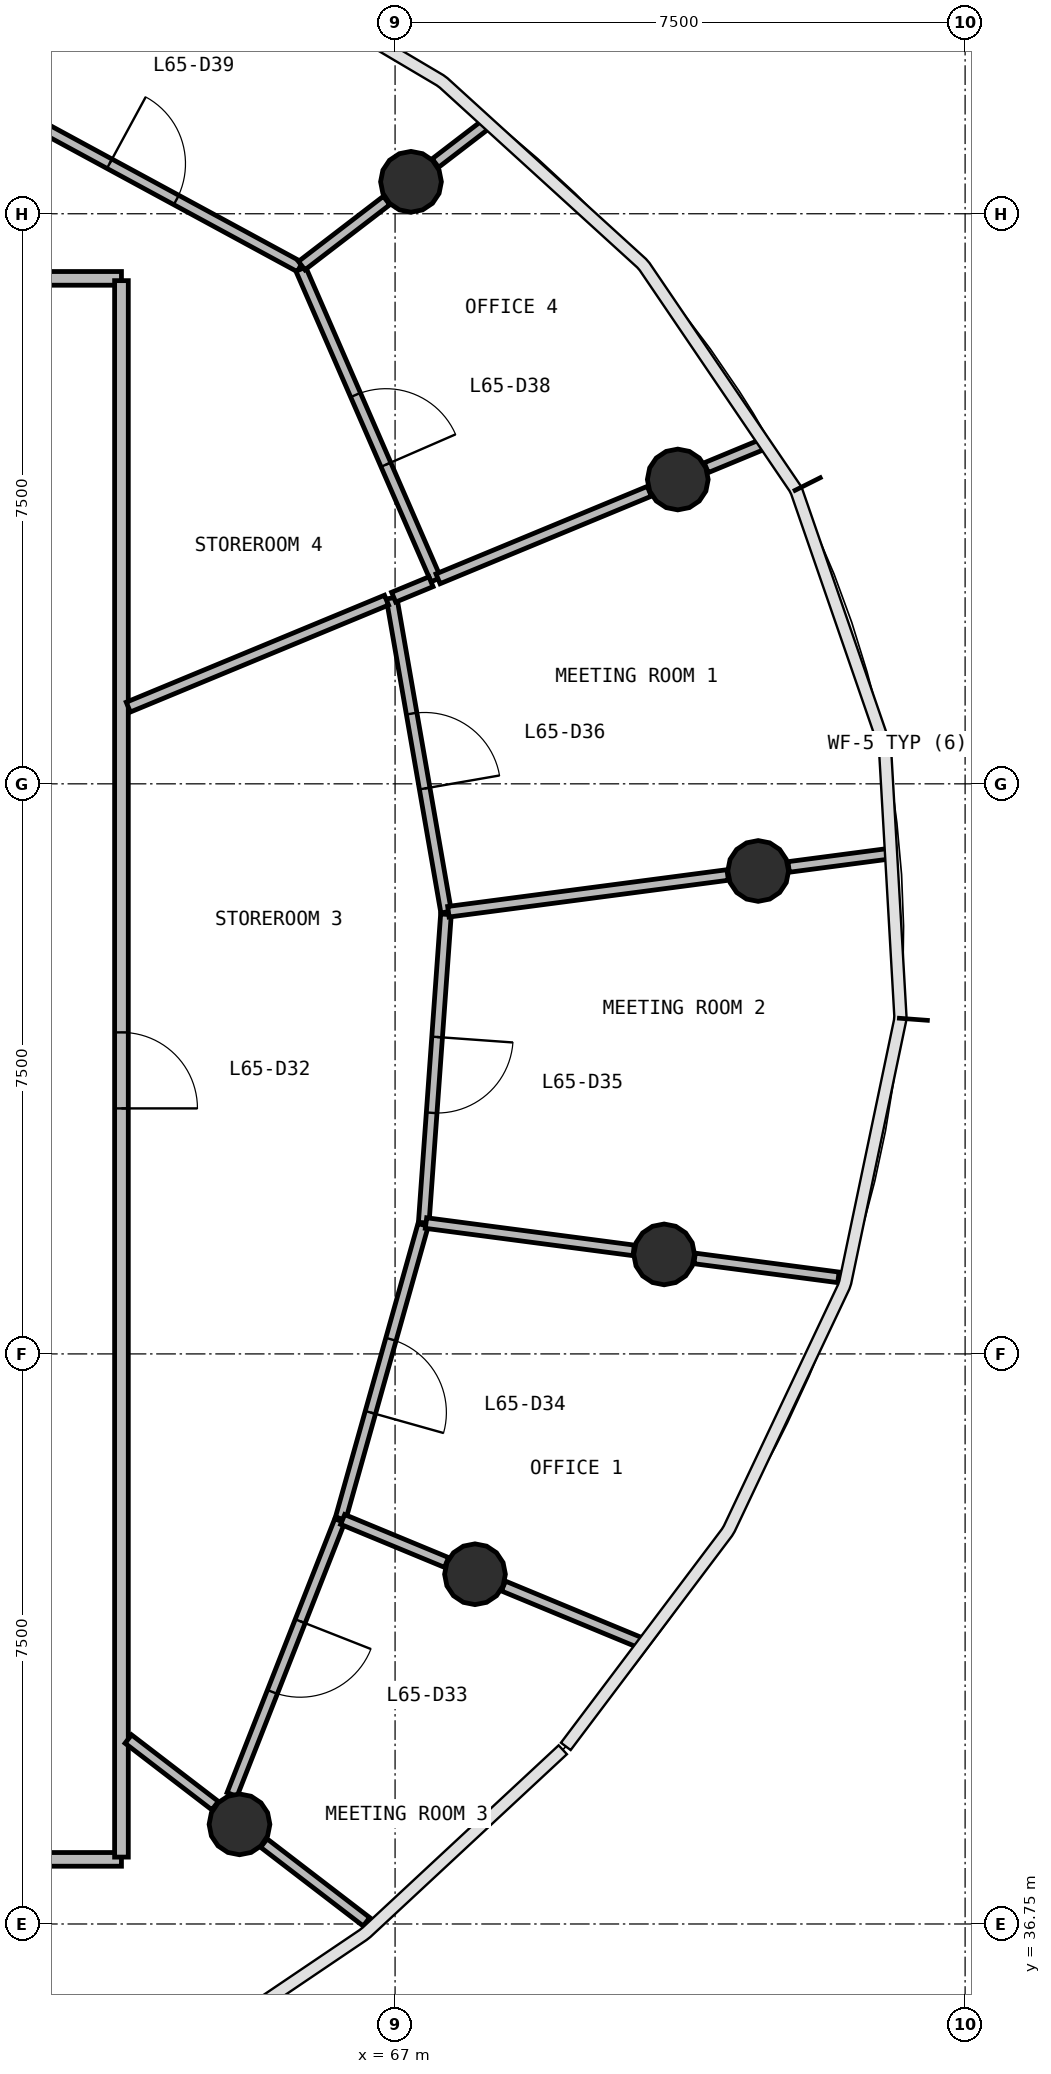
"""IFC4 building model, lengths in metres.
Left out: names, types, materials, properties, quantities, classifications, styles, units other than length and angle.
Written with IfcOpenShell. Run it as: python <this file> out.ifc"""

import sys

from ifc_helpers import new_model, si_unit, direction, frame, frame_2d, origin, origin_2d, place, context, subcontext, project, spatial, rectangle, circle, extrude, source, transform, mapped, element, fill, save


model = new_model("IFC4")
c1 = context("Model", 3, precision=1e-05, world=origin(), true_north=direction((0.0, 1.0)))
c2 = subcontext(c1, "Body", "Model", "MODEL_VIEW")
j1 = project(units=[si_unit("LENGTHUNIT", "METRE"), si_unit("PLANEANGLEUNIT", "RADIAN")], contexts=[c1])
p1 = place(None, origin())
s1 = spatial("IfcSite", under=j1, at=p1, CompositionType="ELEMENT")
p2 = place(p1, origin())
s2 = spatial("IfcBuilding", under=s1, at=p2, CompositionType="ELEMENT")
p3 = place(p2, frame((0.0, 0.0, 265.7)))
s3 = spatial("IfcBuildingStorey", under=s2, at=p3, CompositionType="ELEMENT", Elevation=265.7)
m1 = source(origin(), c2, "Body", "SweptSolid", [
    extrude(circle(Radius=0.4, at=origin_2d()), origin(), (0.0, 0.0, 1.0), 3.9),
])
for number, where, z_axis, x_axis in (
    (1, (71.777, 50.604, 0.0), (0.0, 0.0, 1.0), (1.0, 0.0, 0.0)),
    (2, (70.719, 55.754, 0.0), (0.0, 0.0, 1.0), (1.0, 0.0, 0.0)),
    (3, (67.209, 59.671, 0.0), (0.0, 0.0, 1.0), (1.0, 0.0, 0.0)),
    (4, (64.953, 38.061, 0.0), (0.0, 0.0, 1.0), (1.0, 0.0, 0.0)),
    (5, (68.052, 41.351, 0.0), (0.0, 0.0, 1.0), (1.0, 0.0, 0.0)),
    (6, (70.54, 45.559, 0.0), (0.0, 0.0, 1.0), (1.0, 0.0, 0.0)),
):
    element("IfcColumn", number, at=place(p3, frame(where, z_axis=z_axis, x_axis=x_axis)), inside=s3, PredefinedType="COLUMN", context=c2, shape_type="MappedRepresentation", body=[
        mapped(m1, transform((0.0, 0.0, 0.0), scale=1.0)),
    ])
p4 = place(p3, frame((40.6, 58.4, 0.0), z_axis=(0.0, 0.0, 1.0), x_axis=(1.0, 0.0, 0.0)))
e7 = element("IfcWall", 7, at=p4, inside=s3, PredefinedType="PARTITIONING", context=c2, shape_type="SweptSolid", body=[
    extrude(rectangle(XDim=22.8, YDim=0.18, at=frame_2d((11.4, 0.0))), origin(), (0.0, 0.0, 1.0), 2.92),
])
p5 = place(p4, frame((13.05, 0.0, 0.0)))
e8 = element("IfcOpeningElement", 8, at=p5, cuts=e7, PredefinedType="OPENING", context=c2, shape_type="SweptSolid", body=[
    extrude(rectangle(XDim=0.9, YDim=2.1, at=frame_2d((0.45, 1.05))), frame((0.0, 0.1, 0.0), z_axis=(0.0, -1.0, 0.0), x_axis=(1.0, 0.0, 0.0)), (0.0, 0.0, 1.0), 0.2),
])
p6 = place(p4, frame((10.85, 0.0, 0.0)))
e9 = element("IfcOpeningElement", 9, at=p6, cuts=e7, PredefinedType="OPENING", context=c2, shape_type="SweptSolid", body=[
    extrude(rectangle(XDim=0.9, YDim=2.1, at=frame_2d((0.45, 1.05))), frame((0.0, 0.1, 0.0), z_axis=(0.0, -1.0, 0.0), x_axis=(1.0, 0.0, 0.0)), (0.0, 0.0, 1.0), 0.2),
])
p7 = place(p4, frame((8.75, 0.0, 0.0)))
e10 = element("IfcOpeningElement", 10, at=p7, cuts=e7, PredefinedType="OPENING", context=c2, shape_type="SweptSolid", body=[
    extrude(rectangle(XDim=1.0, YDim=2.1, at=frame_2d((0.5, 1.05))), frame((0.0, 0.1, 0.0), z_axis=(0.0, -1.0, 0.0), x_axis=(1.0, 0.0, 0.0)), (0.0, 0.0, 1.0), 0.2),
])
p8 = place(p4, frame((16.15, 0.0, 0.0)))
e11 = element("IfcOpeningElement", 11, at=p8, cuts=e7, PredefinedType="OPENING", context=c2, shape_type="SweptSolid", body=[
    extrude(rectangle(XDim=1.0, YDim=2.1, at=frame_2d((0.5, 1.05))), frame((0.0, 0.1, 0.0), z_axis=(0.0, -1.0, 0.0), x_axis=(1.0, 0.0, 0.0)), (0.0, 0.0, 1.0), 0.2),
])
p9 = place(p3, frame((63.4, 37.6, 0.0), z_axis=(0.0, 0.0, 1.0), x_axis=(-1.0, 0.0, 0.0)))
e12 = element("IfcWall", 12, at=p9, inside=s3, PredefinedType="PARTITIONING", context=c2, shape_type="SweptSolid", body=[
    extrude(rectangle(XDim=22.8, YDim=0.18, at=frame_2d((11.4, 0.0))), origin(), (0.0, 0.0, 1.0), 2.92),
])
p10 = place(p9, frame((16.15, 0.0, 0.0)))
e13 = element("IfcOpeningElement", 13, at=p10, cuts=e12, PredefinedType="OPENING", context=c2, shape_type="SweptSolid", body=[
    extrude(rectangle(XDim=1.0, YDim=2.1, at=frame_2d((0.5, 1.05))), frame((0.0, 0.1, 0.0), z_axis=(0.0, -1.0, 0.0), x_axis=(1.0, 0.0, 0.0)), (0.0, 0.0, 1.0), 0.2),
])
p11 = place(p9, frame((10.95, 0.0, 0.0)))
e14 = element("IfcOpeningElement", 14, at=p11, cuts=e12, PredefinedType="OPENING", context=c2, shape_type="SweptSolid", body=[
    extrude(rectangle(XDim=1.0, YDim=2.1, at=frame_2d((0.5, 1.05))), frame((0.0, 0.1, 0.0), z_axis=(0.0, -1.0, 0.0), x_axis=(1.0, 0.0, 0.0)), (0.0, 0.0, 1.0), 0.2),
])
p12 = place(p9, frame((8.75, 0.0, 0.0)))
e15 = element("IfcOpeningElement", 15, at=p12, cuts=e12, PredefinedType="OPENING", context=c2, shape_type="SweptSolid", body=[
    extrude(rectangle(XDim=1.0, YDim=2.1, at=frame_2d((0.5, 1.05))), frame((0.0, 0.1, 0.0), z_axis=(0.0, -1.0, 0.0), x_axis=(1.0, 0.0, 0.0)), (0.0, 0.0, 1.0), 0.2),
])
p13 = place(p3, frame((63.4, 58.37, 0.0), z_axis=(0.0, 0.0, 1.0), x_axis=(0.0, -1.0, 0.0)))
e16 = element("IfcWall", 16, at=p13, inside=s3, PredefinedType="PARTITIONING", context=c2, shape_type="SweptSolid", body=[
    extrude(rectangle(XDim=20.74, YDim=0.18, at=frame_2d((10.37, 0.0))), origin(), (0.0, 0.0, 1.0), 2.92),
])
p14 = place(p13, frame((9.89, 0.0, 0.0)))
e17 = element("IfcOpeningElement", 17, at=p14, cuts=e16, PredefinedType="OPENING", context=c2, shape_type="SweptSolid", body=[
    extrude(rectangle(XDim=1.0, YDim=2.1, at=frame_2d((0.5, 1.05))), frame((0.0, 0.1, 0.0), z_axis=(0.0, -1.0, 0.0), x_axis=(1.0, 0.0, 0.0)), (0.0, 0.0, 1.0), 0.2),
])
p15 = place(p3, frame((61.756, 60.714, 0.0), z_axis=(0.0, 0.0, 1.0), x_axis=(0.879039493049, -0.47674895874, 0.0)))
e18 = element("IfcWall", 18, at=p15, inside=s3, PredefinedType="PARTITIONING", context=c2, shape_type="SweptSolid", body=[
    extrude(rectangle(XDim=4.541, YDim=0.14, at=frame_2d((2.271, 0.0))), origin(), (0.0, 0.0, 1.0), 2.92),
])
p16 = place(p15, frame((1.691, 0.0, 0.0)))
e19 = element("IfcOpeningElement", 19, at=p16, cuts=e18, PredefinedType="OPENING", context=c2, shape_type="SweptSolid", body=[
    extrude(rectangle(XDim=1.0, YDim=2.1, at=frame_2d((0.5, 1.05))), frame((0.0, 0.08, 0.0), z_axis=(0.0, -1.0, 0.0), x_axis=(1.0, 0.0, 0.0)), (0.0, 0.0, 1.0), 0.16),
])
p17 = place(p3, frame((65.76, 58.521, 0.0), z_axis=(0.0, 0.0, 1.0), x_axis=(0.398952504151, -0.916971591398, 0.0)))
e20 = element("IfcWall", 20, at=p17, inside=s3, PredefinedType="PARTITIONING", context=c2, shape_type="SweptSolid", body=[
    extrude(rectangle(XDim=4.456, YDim=0.14, at=frame_2d((2.228, 0.0))), origin(), (0.0, 0.0, 1.0), 2.92),
])
p18 = place(p17, frame((1.806, 0.0, 0.0)))
e21 = element("IfcOpeningElement", 21, at=p18, cuts=e20, PredefinedType="OPENING", context=c2, shape_type="SweptSolid", body=[
    extrude(rectangle(XDim=1.0, YDim=2.1, at=frame_2d((0.5, 1.05))), frame((0.0, 0.08, 0.0), z_axis=(0.0, -1.0, 0.0), x_axis=(1.0, 0.0, 0.0)), (0.0, 0.0, 1.0), 0.16),
])
p19 = place(p3, frame((66.954, 54.194, 0.0), z_axis=(0.0, 0.0, 1.0), x_axis=(0.171306772049, -0.985217737279, 0.0)))
e22 = element("IfcWall", 22, at=p19, inside=s3, PredefinedType="PARTITIONING", context=c2, shape_type="SweptSolid", body=[
    extrude(rectangle(XDim=4.193, YDim=0.14, at=frame_2d((2.096, 0.0))), origin(), (0.0, 0.0, 1.0), 2.92),
])
p20 = place(p19, frame((1.543, 0.0, 0.0)))
e23 = element("IfcOpeningElement", 23, at=p20, cuts=e22, PredefinedType="OPENING", context=c2, shape_type="SweptSolid", body=[
    extrude(rectangle(XDim=1.0, YDim=2.1, at=frame_2d((0.5, 1.05))), frame((0.0, 0.08, 0.0), z_axis=(0.0, -1.0, 0.0), x_axis=(1.0, 0.0, 0.0)), (0.0, 0.0, 1.0), 0.16),
])
p21 = place(p3, frame((67.67, 50.033, 0.0), z_axis=(0.0, 0.0, 1.0), x_axis=(-0.071895294676, -0.997412184908, 0.0)))
e24 = element("IfcWall", 24, at=p21, inside=s3, PredefinedType="PARTITIONING", context=c2, shape_type="SweptSolid", body=[
    extrude(rectangle(XDim=4.068, YDim=0.14, at=frame_2d((2.034, 0.0))), origin(), (0.0, 0.0, 1.0), 2.92),
])
p22 = place(p21, frame((1.618, 0.0, 0.0)))
e25 = element("IfcOpeningElement", 25, at=p22, cuts=e24, PredefinedType="OPENING", context=c2, shape_type="SweptSolid", body=[
    extrude(rectangle(XDim=1.0, YDim=2.1, at=frame_2d((0.5, 1.05))), frame((0.0, 0.08, 0.0), z_axis=(0.0, -1.0, 0.0), x_axis=(1.0, 0.0, 0.0)), (0.0, 0.0, 1.0), 0.16),
])
p23 = place(p3, frame((67.369, 45.947, 0.0), z_axis=(0.0, 0.0, 1.0), x_axis=(-0.270692717002, -0.962665805439, 0.0)))
e26 = element("IfcWall", 26, at=p23, inside=s3, PredefinedType="PARTITIONING", context=c2, shape_type="SweptSolid", body=[
    extrude(rectangle(XDim=4.013, YDim=0.14, at=frame_2d((2.006, 0.0))), origin(), (0.0, 0.0, 1.0), 2.92),
])
p24 = place(p23, frame((1.562, 0.0, 0.0)))
e27 = element("IfcOpeningElement", 27, at=p24, cuts=e26, PredefinedType="OPENING", context=c2, shape_type="SweptSolid", body=[
    extrude(rectangle(XDim=1.0, YDim=2.1, at=frame_2d((0.5, 1.05))), frame((0.0, 0.08, 0.0), z_axis=(0.0, -1.0, 0.0), x_axis=(1.0, 0.0, 0.0)), (0.0, 0.0, 1.0), 0.16),
])
p25 = place(p3, frame((66.272, 42.056, 0.0), z_axis=(0.0, 0.0, 1.0), x_axis=(-0.365958681955, -0.930631099363, 0.0)))
e28 = element("IfcWall", 28, at=p25, inside=s3, PredefinedType="PARTITIONING", context=c2, shape_type="SweptSolid", body=[
    extrude(rectangle(XDim=3.871, YDim=0.14, at=frame_2d((1.936, 0.0))), origin(), (0.0, 0.0, 1.0), 2.92),
])
p26 = place(p25, frame((1.421, 0.0, 0.0)))
e29 = element("IfcOpeningElement", 29, at=p26, cuts=e28, PredefinedType="OPENING", context=c2, shape_type="SweptSolid", body=[
    extrude(rectangle(XDim=1.0, YDim=2.1, at=frame_2d((0.5, 1.05))), frame((0.0, 0.08, 0.0), z_axis=(0.0, -1.0, 0.0), x_axis=(1.0, 0.0, 0.0)), (0.0, 0.0, 1.0), 0.16),
])
p27 = place(p3, frame((63.49, 52.759, 0.0), z_axis=(0.0, 0.0, 1.0), x_axis=(0.923884131492, 0.382672329255, 0.0)))
e30 = element("IfcWall", 30, at=p27, inside=s3, PredefinedType="PARTITIONING", context=c2, shape_type="SweptSolid", body=[
    extrude(rectangle(XDim=3.677, YDim=0.14, at=frame_2d((1.839, 0.0))), origin(), (0.0, 0.0, 1.0), 2.92),
])
p28 = place(p3, frame((67.701, 50.067, 0.0), z_axis=(0.0, 0.0, 1.0), x_axis=(0.991450259567, 0.130485182315, 0.0)))
e31 = element("IfcWall", 31, at=p28, inside=s3, PredefinedType="PARTITIONING", context=c2, shape_type="SweptSolid", body=[
    extrude(rectangle(XDim=3.707, YDim=0.14, at=frame_2d((1.853, 0.0))), origin(), (0.0, 0.0, 1.0), 2.92),
])
p29 = place(p3, frame((67.565, 54.447, 0.0), z_axis=(0.0, 0.0, 1.0), x_axis=(0.923881369595, 0.382678997223, 0.0)))
e32 = element("IfcWall", 32, at=p29, inside=s3, PredefinedType="PARTITIONING", context=c2, shape_type="SweptSolid", body=[
    extrude(rectangle(XDim=3.009, YDim=0.14, at=frame_2d((1.505, 0.0))), origin(), (0.0, 0.0, 1.0), 2.92),
])
p30 = place(p3, frame((67.407, 45.972, 0.0), z_axis=(0.0, 0.0, 1.0), x_axis=(0.991448565266, -0.13049805528, 0.0)))
e33 = element("IfcWall", 33, at=p30, inside=s3, PredefinedType="PARTITIONING", context=c2, shape_type="SweptSolid", body=[
    extrude(rectangle(XDim=2.756, YDim=0.14, at=frame_2d((1.378, 0.0))), origin(), (0.0, 0.0, 1.0), 2.92),
])
p31 = place(p3, frame((68.426, 41.196, 0.0), z_axis=(0.0, 0.0, 1.0), x_axis=(0.923874199787, -0.382696306447, 0.0)))
e34 = element("IfcWall", 34, at=p31, inside=s3, PredefinedType="PARTITIONING", context=c2, shape_type="SweptSolid", body=[
    extrude(rectangle(XDim=1.961, YDim=0.14, at=frame_2d((0.98, 0.0))), origin(), (0.0, 0.0, 1.0), 2.92),
])
p32 = place(p3, frame((70.941, 45.506, 0.0), z_axis=(0.0, 0.0, 1.0), x_axis=(0.991447762037, -0.130504157605, 0.0)))
e35 = element("IfcWall", 35, at=p32, inside=s3, PredefinedType="PARTITIONING", context=c2, shape_type="SweptSolid", body=[
    extrude(rectangle(XDim=1.908, YDim=0.14, at=frame_2d((0.954, 0.0))), origin(), (0.0, 0.0, 1.0), 2.92),
])
p33 = place(p3, frame((65.274, 37.814, 0.0), z_axis=(0.0, 0.0, 1.0), x_axis=(0.793391519138, -0.608711670136, 0.0)))
e36 = element("IfcWall", 36, at=p33, inside=s3, PredefinedType="PARTITIONING", context=c2, shape_type="SweptSolid", body=[
    extrude(rectangle(XDim=1.701, YDim=0.14, at=frame_2d((0.851, 0.0))), origin(), (0.0, 0.0, 1.0), 2.92),
])
p34 = place(p3, frame((63.49, 39.183, 0.0), z_axis=(0.0, 0.0, 1.0), x_axis=(0.793316945216, -0.608808857059, 0.0)))
e37 = element("IfcWall", 37, at=p34, inside=s3, PredefinedType="PARTITIONING", context=c2, shape_type="SweptSolid", body=[
    extrude(rectangle(XDim=1.44, YDim=0.14, at=frame_2d((0.72, 0.0))), origin(), (0.0, 0.0, 1.0), 2.92),
])
p35 = place(p3, frame((66.311, 42.073, 0.0), z_axis=(0.0, 0.0, 1.0), x_axis=(0.923807607281, -0.382857029098, 0.0)))
e38 = element("IfcWall", 38, at=p35, inside=s3, PredefinedType="PARTITIONING", context=c2, shape_type="SweptSolid", body=[
    extrude(rectangle(XDim=1.479, YDim=0.14, at=frame_2d((0.74, 0.0))), origin(), (0.0, 0.0, 1.0), 2.92),
])
p36 = place(p3, frame((65.771, 58.567, 0.0), z_axis=(0.0, 0.0, 1.0), x_axis=(0.793313221417, 0.608813709376, 0.0)))
e39 = element("IfcWall", 39, at=p36, inside=s3, PredefinedType="PARTITIONING", context=c2, shape_type="SweptSolid", body=[
    extrude(rectangle(XDim=1.408, YDim=0.14, at=frame_2d((0.704, 0.0))), origin(), (0.0, 0.0, 1.0), 2.92),
])
p37 = place(p3, frame((61.799, 60.771, 0.0), z_axis=(0.0, 0.0, 1.0), x_axis=(0.608805214603, 0.793319740503, 0.0)))
e40 = element("IfcWall", 40, at=p37, inside=s3, PredefinedType="PARTITIONING", context=c2, shape_type="SweptSolid", body=[
    extrude(rectangle(XDim=1.317, YDim=0.14, at=frame_2d((0.658, 0.0))), origin(), (0.0, 0.0, 1.0), 2.92),
])
p38 = place(p3, frame((72.178, 50.656, 0.0), z_axis=(0.0, 0.0, 1.0), x_axis=(0.991442117533, 0.13054703207, 0.0)))
e41 = element("IfcWall", 41, at=p38, inside=s3, PredefinedType="PARTITIONING", context=c2, shape_type="SweptSolid", body=[
    extrude(rectangle(XDim=1.365, YDim=0.14, at=frame_2d((0.683, 0.0))), origin(), (0.0, 0.0, 1.0), 2.92),
])
p39 = place(p3, frame((67.531, 59.917, 0.0), z_axis=(0.0, 0.0, 1.0), x_axis=(0.793396032013, 0.608705788034, 0.0)))
e42 = element("IfcWall", 42, at=p39, inside=s3, PredefinedType="PARTITIONING", context=c2, shape_type="SweptSolid", body=[
    extrude(rectangle(XDim=0.822, YDim=0.14, at=frame_2d((0.411, 0.0))), origin(), (0.0, 0.0, 1.0), 2.92),
])
p40 = place(p3, frame((71.094, 55.909, 0.0), z_axis=(0.0, 0.0, 1.0), x_axis=(0.923945811289, 0.382523382031, 0.0)))
e43 = element("IfcWall", 43, at=p40, inside=s3, PredefinedType="PARTITIONING", context=c2, shape_type="SweptSolid", body=[
    extrude(rectangle(XDim=0.796, YDim=0.14, at=frame_2d((0.398, 0.0))), origin(), (0.0, 0.0, 1.0), 2.92),
])
p41 = place(p3, frame((66.981, 54.206, 0.0), z_axis=(0.0, 0.0, 1.0), x_axis=(0.923944086963, 0.382527546938, 0.0)))
e44 = element("IfcWall", 44, at=p41, inside=s3, PredefinedType="PARTITIONING", context=c2, shape_type="SweptSolid", body=[
    extrude(rectangle(XDim=0.532, YDim=0.14, at=frame_2d((0.266, 0.0))), origin(), (0.0, 0.0, 1.0), 2.92),
])
m2 = source(origin(), c2, "Body", "SweptSolid", [
    extrude(rectangle(XDim=1.0, YDim=2.1, at=frame_2d((0.5, 1.05))), frame((0.0, 0.025, 0.0), z_axis=(0.0, -1.0, 0.0), x_axis=(1.0, 0.0, 0.0)), (0.0, 0.0, 1.0), 0.05),
])
p42 = place(p14, origin())
e45 = element("IfcDoor", 45, at=p42, inside=s3, OperationType="SINGLE_SWING_RIGHT", PredefinedType="DOOR", context=c2, shape_type="MappedRepresentation", body=[
    mapped(m2, transform((0.0, 0.0, 0.0), scale=1.0)),
])
fill(e17, e45)
p43 = place(p26, origin())
e46 = element("IfcDoor", 46, at=p43, inside=s3, OperationType="SINGLE_SWING_LEFT", PredefinedType="DOOR", context=c2, shape_type="MappedRepresentation", body=[
    mapped(m2, transform((0.0, 0.0, 0.0), scale=1.0)),
])
fill(e29, e46)
p44 = place(p24, origin())
e47 = element("IfcDoor", 47, at=p44, inside=s3, OperationType="SINGLE_SWING_RIGHT", PredefinedType="DOOR", context=c2, shape_type="MappedRepresentation", body=[
    mapped(m2, transform((0.0, 0.0, 0.0), scale=1.0)),
])
fill(e27, e47)
p45 = place(p22, origin())
e48 = element("IfcDoor", 48, at=p45, inside=s3, OperationType="SINGLE_SWING_LEFT", PredefinedType="DOOR", context=c2, shape_type="MappedRepresentation", body=[
    mapped(m2, transform((0.0, 0.0, 0.0), scale=1.0)),
])
fill(e25, e48)
p46 = place(p20, origin())
e49 = element("IfcDoor", 49, at=p46, inside=s3, OperationType="SINGLE_SWING_RIGHT", PredefinedType="DOOR", context=c2, shape_type="MappedRepresentation", body=[
    mapped(m2, transform((0.0, 0.0, 0.0), scale=1.0)),
])
fill(e23, e49)
p47 = place(p18, origin())
e50 = element("IfcDoor", 50, at=p47, inside=s3, OperationType="SINGLE_SWING_RIGHT", PredefinedType="DOOR", context=c2, shape_type="MappedRepresentation", body=[
    mapped(m2, transform((0.0, 0.0, 0.0), scale=1.0)),
])
fill(e21, e50)
p48 = place(p16, origin())
e51 = element("IfcDoor", 51, at=p48, inside=s3, OperationType="SINGLE_SWING_LEFT", PredefinedType="DOOR", context=c2, shape_type="MappedRepresentation", body=[
    mapped(m2, transform((0.0, 0.0, 0.0), scale=1.0)),
])
fill(e19, e51)
save(model, sys.argv[1])
